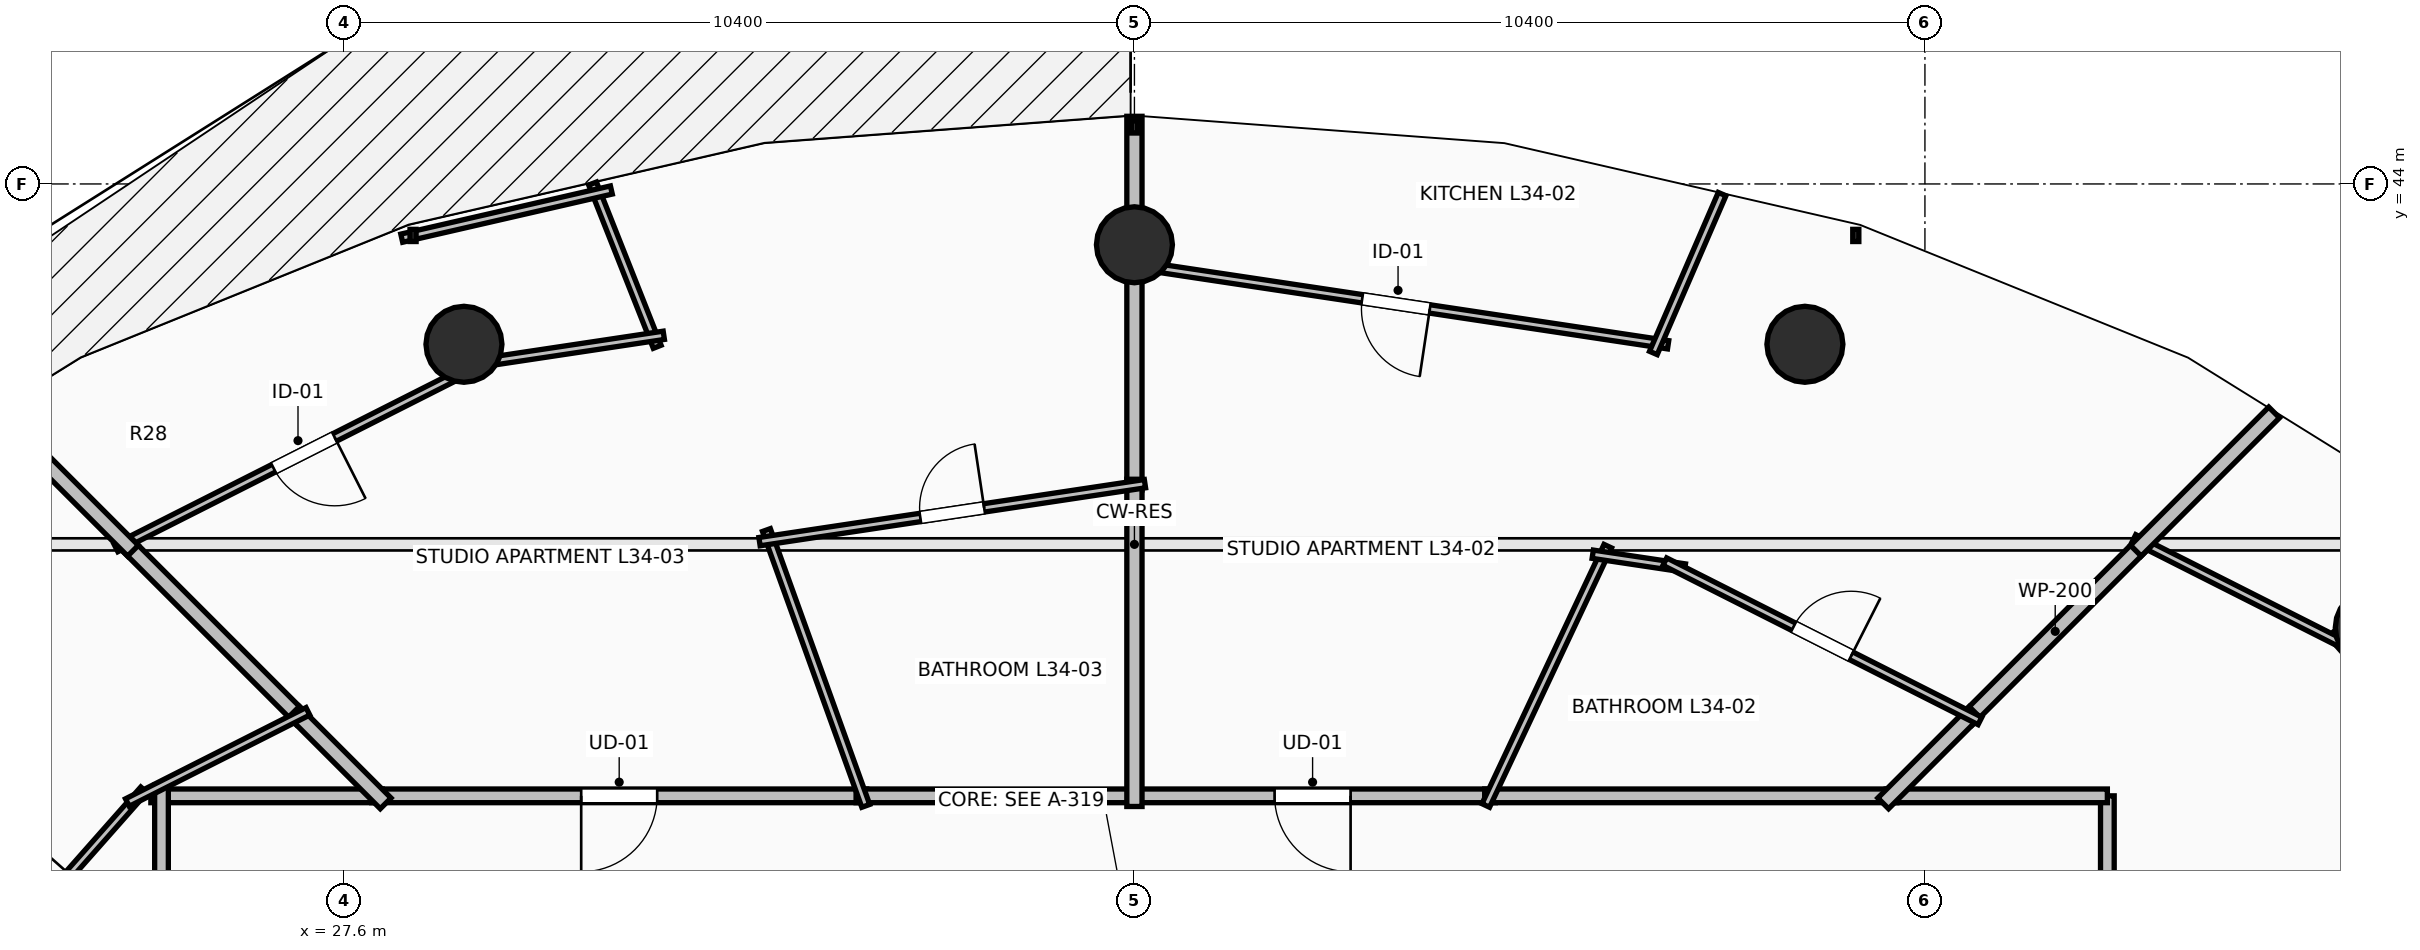
"""IFC4 building model, lengths in metres.
Left out: names, types, materials, properties, quantities, classifications, styles, units other than length and angle.
Written with IfcOpenShell. Run it as: python <this file> out.ifc"""

import sys

from ifc_helpers import new_model, si_unit, direction, frame, frame_2d, origin, origin_2d, place, context, subcontext, project, spatial, rectangle, circle, extrude, element, fill, save


model = new_model("IFC4")
c1 = context("Model", 3, precision=1e-05, world=origin(), true_north=direction((0.0, 1.0)))
c2 = subcontext(c1, "Body", "Model", "MODEL_VIEW")
j1 = project(units=[si_unit("LENGTHUNIT", "METRE"), si_unit("PLANEANGLEUNIT", "RADIAN")], contexts=[c1])
p1 = place(None, origin())
s1 = spatial("IfcSite", under=j1, at=p1, CompositionType="ELEMENT")
p2 = place(p1, origin())
s2 = spatial("IfcBuilding", under=s1, at=p2, CompositionType="ELEMENT")
p3 = place(p2, frame((0.0, 0.0, 129.1)))
s3 = spatial("IfcBuildingStorey", under=s2, at=p3, CompositionType="ELEMENT", Elevation=129.1)
for number, where, z_axis, x_axis in (
    (1, (54.299, 38.162, 0.0), (0.0, 0.0, 1.0), (0.707, 0.707, 0.0)),
    (2, (46.821, 41.891, 0.0), (0.0, 0.0, 1.0), (0.383, 0.924, 0.0)),
    (3, (38.0, 43.2, 0.0), (0.0, 0.0, 1.0), (0.0, 1.0, 0.0)),
    (4, (29.179, 41.891, 0.0), (0.0, 0.0, 1.0), (-0.383, 0.924, 0.0)),
):
    element("IfcColumn", number, at=place(p3, frame(where, z_axis=z_axis, x_axis=x_axis)), inside=s3, PredefinedType="COLUMN", context=c2, shape_type="SweptSolid", body=[
        extrude(circle(Radius=0.5, at=origin_2d()), origin(), (0.0, 0.0, 1.0), 3.5),
    ])
p4 = place(p3, frame((50.8, 30.548, 0.0), z_axis=(0.0, 0.0, 1.0), x_axis=(0.0, 1.0, 0.0)))
e5 = element("IfcWall", 5, at=p4, inside=s3, PredefinedType="PARTITIONING", context=c2, shape_type="SweptSolid", body=[
    extrude(rectangle(XDim=5.402, YDim=0.18, at=frame_2d((2.701, 0.0))), origin(), (0.0, 0.0, 1.0), 2.432),
])
p5 = place(p4, frame((2.201, 0.0, 0.0)))
e6 = element("IfcOpeningElement", 6, at=p5, cuts=e5, PredefinedType="OPENING", context=c2, shape_type="SweptSolid", body=[
    extrude(rectangle(XDim=1.0, YDim=2.15, at=frame_2d((0.5, 1.075))), frame((0.0, 0.105, 0.0), z_axis=(0.0, -1.0, 0.0), x_axis=(1.0, 0.0, 0.0)), (0.0, 0.0, 1.0), 0.21),
])
p6 = place(p3, frame((50.8, 35.95, 0.0), z_axis=(0.0, 0.0, 1.0), x_axis=(-1.0, 0.0, 0.0)))
e7 = element("IfcWall", 7, at=p6, inside=s3, PredefinedType="PARTITIONING", context=c2, shape_type="SweptSolid", body=[
    extrude(rectangle(XDim=2.91, YDim=0.18, at=frame_2d((1.455, 0.0))), origin(), (0.0, 0.0, 1.0), 2.432),
])
p7 = place(p3, frame((42.748, 35.95, 0.0), z_axis=(0.0, 0.0, 1.0), x_axis=(-1.0, 0.0, 0.0)))
e8 = element("IfcWall", 8, at=p7, inside=s3, PredefinedType="PARTITIONING", context=c2, shape_type="SweptSolid", body=[
    extrude(rectangle(XDim=4.808, YDim=0.18, at=frame_2d((2.404, 0.0))), origin(), (0.0, 0.0, 1.0), 3.24),
])
p8 = place(p7, frame((1.904, 0.0, 0.0)))
e9 = element("IfcOpeningElement", 9, at=p8, cuts=e8, PredefinedType="OPENING", context=c2, shape_type="SweptSolid", body=[
    extrude(rectangle(XDim=1.0, YDim=2.15, at=frame_2d((0.5, 1.075))), frame((0.0, 0.105, 0.0), z_axis=(0.0, -1.0, 0.0), x_axis=(1.0, 0.0, 0.0)), (0.0, 0.0, 1.0), 0.21),
])
p9 = place(p3, frame((48.03, 35.95, 0.0), z_axis=(0.0, 0.0, 1.0), x_axis=(-1.0, 0.0, 0.0)))
e10 = element("IfcWall", 10, at=p9, inside=s3, PredefinedType="PARTITIONING", context=c2, shape_type="SweptSolid", body=[
    extrude(rectangle(XDim=5.422, YDim=0.18, at=frame_2d((2.711, 0.0))), origin(), (0.0, 0.0, 1.0), 2.432),
])
p10 = place(p3, frame((34.478, 35.95, 0.0), z_axis=(0.0, 0.0, 1.0), x_axis=(-1.0, 0.0, 0.0)))
e11 = element("IfcWall", 11, at=p10, inside=s3, PredefinedType="PARTITIONING", context=c2, shape_type="SweptSolid", body=[
    extrude(rectangle(XDim=6.513, YDim=0.18, at=frame_2d((3.256, 0.0))), origin(), (0.0, 0.0, 1.0), 2.432),
])
p11 = place(p10, frame((2.757, 0.0, 0.0)))
e12 = element("IfcOpeningElement", 12, at=p11, cuts=e11, PredefinedType="OPENING", context=c2, shape_type="SweptSolid", body=[
    extrude(rectangle(XDim=1.0, YDim=2.15, at=frame_2d((0.5, 1.075))), frame((0.0, 0.105, 0.0), z_axis=(0.0, -1.0, 0.0), x_axis=(1.0, 0.0, 0.0)), (0.0, 0.0, 1.0), 0.21),
])
p12 = place(p3, frame((38.08, 35.95, 0.0), z_axis=(0.0, 0.0, 1.0), x_axis=(-1.0, 0.0, 0.0)))
e13 = element("IfcWall", 13, at=p12, inside=s3, PredefinedType="PARTITIONING", context=c2, shape_type="SweptSolid", body=[
    extrude(rectangle(XDim=3.742, YDim=0.18, at=frame_2d((1.871, 0.0))), origin(), (0.0, 0.0, 1.0), 3.24),
])
p13 = place(p3, frame((28.105, 35.95, 0.0), z_axis=(0.0, 0.0, 1.0), x_axis=(-1.0, 0.0, 0.0)))
e14 = element("IfcWall", 14, at=p13, inside=s3, PredefinedType="PARTITIONING", context=c2, shape_type="SweptSolid", body=[
    extrude(rectangle(XDim=3.045, YDim=0.18, at=frame_2d((1.522, 0.0))), origin(), (0.0, 0.0, 1.0), 2.432),
])
p14 = place(p3, frame((25.2, 36.09, 0.0), z_axis=(0.0, 0.0, 1.0), x_axis=(0.0, -1.0, 0.0)))
e15 = element("IfcWall", 15, at=p14, inside=s3, PredefinedType="PARTITIONING", context=c2, shape_type="SweptSolid", body=[
    extrude(rectangle(XDim=4.141, YDim=0.18, at=frame_2d((2.071, 0.0))), origin(), (0.0, 0.0, 1.0), 2.432),
])
p15 = place(p3, frame((57.668, 33.645, 0.0), z_axis=(0.0, 0.0, 1.0), x_axis=(-0.66214504072, 0.749375703536, 0.0)))
e16 = element("IfcWall", 16, at=p15, inside=s3, PredefinedType="PARTITIONING", context=c2, shape_type="SweptSolid", body=[
    extrude(rectangle(XDim=5.922, YDim=0.11, at=frame_2d((2.961, 0.0))), origin(), (0.0, 0.0, 1.0), 2.432),
])
p16 = place(p15, frame((2.511, 0.0, 0.0)))
e17 = element("IfcOpeningElement", 17, at=p16, cuts=e16, PredefinedType="OPENING", context=c2, shape_type="SweptSolid", body=[
    extrude(rectangle(XDim=0.9, YDim=2.1, at=frame_2d((0.45, 1.05))), frame((0.0, 0.07, 0.0), z_axis=(0.0, -1.0, 0.0), x_axis=(1.0, 0.0, 0.0)), (0.0, 0.0, 1.0), 0.14),
])
p17 = place(p3, frame((53.964, 37.915, 0.0), z_axis=(0.0, 0.0, 1.0), x_axis=(-0.892546166909, 0.450956028828, 0.0)))
e18 = element("IfcWall", 18, at=p17, inside=s3, PredefinedType="PARTITIONING", context=c2, shape_type="SweptSolid", body=[
    extrude(rectangle(XDim=3.154, YDim=0.11, at=frame_2d((1.577, 0.0))), origin(), (0.0, 0.0, 1.0), 2.432),
])
p18 = place(p3, frame((51.274, 39.274, 0.0), z_axis=(0.0, 0.0, 1.0), x_axis=(-0.707106781187, -0.707106781187, 0.0)))
e19 = element("IfcWall", 19, at=p18, inside=s3, PredefinedType="PARTITIONING", context=c2, shape_type="SweptSolid", body=[
    extrude(rectangle(XDim=3.281, YDim=0.2, at=frame_2d((1.64, 0.0))), origin(), (0.0, 0.0, 1.0), 2.874),
])
p19 = place(p3, frame((49.053, 37.053, 0.0), z_axis=(0.0, 0.0, 1.0), x_axis=(-0.707106781187, -0.707106781187, 0.0)))
e20 = element("IfcWall", 20, at=p19, inside=s3, PredefinedType="PARTITIONING", context=c2, shape_type="SweptSolid", body=[
    extrude(rectangle(XDim=1.7, YDim=0.2, at=frame_2d((0.85, 0.0))), origin(), (0.0, 0.0, 1.0), 2.432),
])
p20 = place(p3, frame((52.994, 40.994, 0.0), z_axis=(0.0, 0.0, 1.0), x_axis=(-0.707106781187, -0.707106781187, 0.0)))
e21 = element("IfcWall", 21, at=p20, inside=s3, PredefinedType="PARTITIONING", context=c2, shape_type="SweptSolid", body=[
    extrude(rectangle(XDim=2.572, YDim=0.2, at=frame_2d((1.286, 0.0))), origin(), (0.0, 0.0, 1.0), 2.728),
])
p21 = place(p3, frame((42.622, 35.823, 0.0), z_axis=(0.0, 0.0, 1.0), x_axis=(0.425768969191, 0.904831909735, 0.0)))
e22 = element("IfcWall", 22, at=p21, inside=s3, PredefinedType="PARTITIONING", context=c2, shape_type="SweptSolid", body=[
    extrude(rectangle(XDim=3.77, YDim=0.11, at=frame_2d((1.885, 0.0))), origin(), (0.0, 0.0, 1.0), 2.874),
])
p22 = place(p3, frame((44.03, 39.129, 0.0), z_axis=(0.0, 0.0, 1.0), x_axis=(0.988983067014, -0.148028690329, 0.0)))
e23 = element("IfcWall", 23, at=p22, inside=s3, PredefinedType="PARTITIONING", context=c2, shape_type="SweptSolid", body=[
    extrude(rectangle(XDim=1.225, YDim=0.11, at=frame_2d((0.613, 0.0))), origin(), (0.0, 0.0, 1.0), 2.874),
])
p23 = place(p3, frame((44.978, 39.031, 0.0), z_axis=(0.0, 0.0, 1.0), x_axis=(0.892495276856, -0.451056737882, 0.0)))
e24 = element("IfcWall", 24, at=p23, inside=s3, PredefinedType="PARTITIONING", context=c2, shape_type="SweptSolid", body=[
    extrude(rectangle(XDim=4.645, YDim=0.11, at=frame_2d((2.323, 0.0))), origin(), (0.0, 0.0, 1.0), 2.432),
])
p24 = place(p23, frame((1.898, 0.0, 0.0)))
e25 = element("IfcOpeningElement", 25, at=p24, cuts=e24, PredefinedType="OPENING", context=c2, shape_type="SweptSolid", body=[
    extrude(rectangle(XDim=0.85, YDim=2.1, at=frame_2d((0.425, 1.05))), frame((0.0, 0.07, 0.0), z_axis=(0.0, -1.0, 0.0), x_axis=(1.0, 0.0, 0.0)), (0.0, 0.0, 1.0), 0.14),
])
p25 = place(p3, frame((45.021, 41.884, 0.0), z_axis=(0.0, 0.0, 1.0), x_axis=(-0.988887079739, 0.148668569392, 0.0)))
e26 = element("IfcWall", 26, at=p25, inside=s3, PredefinedType="PARTITIONING", context=c2, shape_type="SweptSolid", body=[
    extrude(rectangle(XDim=7.24, YDim=0.11, at=frame_2d((3.62, 0.0))), origin(), (0.0, 0.0, 1.0), 2.432),
])
p26 = place(p25, frame((3.17, 0.0, 0.0)))
e27 = element("IfcOpeningElement", 27, at=p26, cuts=e26, PredefinedType="OPENING", context=c2, shape_type="SweptSolid", body=[
    extrude(rectangle(XDim=0.9, YDim=2.1, at=frame_2d((0.45, 1.05))), frame((0.0, 0.07, 0.0), z_axis=(0.0, -1.0, 0.0), x_axis=(1.0, 0.0, 0.0)), (0.0, 0.0, 1.0), 0.14),
])
p27 = place(p3, frame((45.732, 43.866, 0.0), z_axis=(0.0, 0.0, 1.0), x_axis=(-0.397125966554, -0.91776411277, 0.0)))
e28 = element("IfcWall", 28, at=p27, inside=s3, PredefinedType="PARTITIONING", context=c2, shape_type="SweptSolid", body=[
    extrude(rectangle(XDim=2.277, YDim=0.11, at=frame_2d((1.139, 0.0))), origin(), (0.0, 0.0, 1.0), 2.728),
])
p28 = place(p3, frame((38.0, 42.94, 0.0), z_axis=(0.0, 0.0, 1.0), x_axis=(0.0, -1.0, 0.0)))
e29 = element("IfcWall", 29, at=p28, inside=s3, PredefinedType="PARTITIONING", context=c2, shape_type="SweptSolid", body=[
    extrude(rectangle(XDim=2.965, YDim=0.2, at=frame_2d((1.482, 0.0))), origin(), (0.0, 0.0, 1.0), 2.874),
])
p29 = place(p3, frame((38.0, 40.115, 0.0), z_axis=(0.0, 0.0, 1.0), x_axis=(0.0, -1.0, 0.0)))
e30 = element("IfcWall", 30, at=p29, inside=s3, PredefinedType="PARTITIONING", context=c2, shape_type="SweptSolid", body=[
    extrude(rectangle(XDim=4.305, YDim=0.2, at=frame_2d((2.152, 0.0))), origin(), (0.0, 0.0, 1.0), 2.874),
])
p30 = place(p3, frame((38.0, 44.89, 0.0), z_axis=(0.0, 0.0, 1.0), x_axis=(0.0, -1.0, 0.0)))
e31 = element("IfcWall", 31, at=p30, inside=s3, PredefinedType="PARTITIONING", context=c2, shape_type="SweptSolid", body=[
    extrude(rectangle(XDim=2.09, YDim=0.2, at=frame_2d((1.045, 0.0))), origin(), (0.0, 0.0, 1.0), 3.24),
])
p31 = place(p3, frame((34.465, 35.818, 0.0), z_axis=(0.0, 0.0, 1.0), x_axis=(-0.338813618534, 0.940853512453, 0.0)))
e32 = element("IfcWall", 32, at=p31, inside=s3, PredefinedType="PARTITIONING", context=c2, shape_type="SweptSolid", body=[
    extrude(rectangle(XDim=3.856, YDim=0.11, at=frame_2d((1.928, 0.0))), origin(), (0.0, 0.0, 1.0), 2.432),
])
p32 = place(p3, frame((33.068, 39.294, 0.0), z_axis=(0.0, 0.0, 1.0), x_axis=(0.988876905643, 0.148736227888, 0.0)))
e33 = element("IfcWall", 33, at=p32, inside=s3, PredefinedType="PARTITIONING", context=c2, shape_type="SweptSolid", body=[
    extrude(rectangle(XDim=5.128, YDim=0.11, at=frame_2d((2.564, 0.0))), origin(), (0.0, 0.0, 1.0), 2.432),
])
p33 = place(p32, frame((2.139, 0.0, 0.0)))
e34 = element("IfcOpeningElement", 34, at=p33, cuts=e33, PredefinedType="OPENING", context=c2, shape_type="SweptSolid", body=[
    extrude(rectangle(XDim=0.85, YDim=2.1, at=frame_2d((0.425, 1.05))), frame((0.0, 0.07, 0.0), z_axis=(0.0, -1.0, 0.0), x_axis=(1.0, 0.0, 0.0)), (0.0, 0.0, 1.0), 0.14),
])
p34 = place(p3, frame((30.872, 44.005, 0.0), z_axis=(0.0, 0.0, 1.0), x_axis=(0.368016079814, -0.929819426017, 0.0)))
e35 = element("IfcWall", 35, at=p34, inside=s3, PredefinedType="PARTITIONING", context=c2, shape_type="SweptSolid", body=[
    extrude(rectangle(XDim=2.309, YDim=0.11, at=frame_2d((1.155, 0.0))), origin(), (0.0, 0.0, 1.0), 2.728),
])
p35 = place(p3, frame((31.808, 42.009, 0.0), z_axis=(0.0, 0.0, 1.0), x_axis=(-0.988887788943, -0.148663851958, 0.0)))
e36 = element("IfcWall", 36, at=p35, inside=s3, PredefinedType="PARTITIONING", context=c2, shape_type="SweptSolid", body=[
    extrude(rectangle(XDim=2.547, YDim=0.11, at=frame_2d((1.273, 0.0))), origin(), (0.0, 0.0, 1.0), 3.24),
])
p36 = place(p3, frame((29.553, 41.714, 0.0), z_axis=(0.0, 0.0, 1.0), x_axis=(-0.892438454993, -0.451169152369, 0.0)))
e37 = element("IfcWall", 37, at=p36, inside=s3, PredefinedType="PARTITIONING", context=c2, shape_type="SweptSolid", body=[
    extrude(rectangle(XDim=5.549, YDim=0.11, at=frame_2d((2.774, 0.0))), origin(), (0.0, 0.0, 1.0), 2.432),
])
p37 = place(p36, frame((2.324, 0.0, 0.0)))
e38 = element("IfcOpeningElement", 38, at=p37, cuts=e37, PredefinedType="OPENING", context=c2, shape_type="SweptSolid", body=[
    extrude(rectangle(XDim=0.9, YDim=2.1, at=frame_2d((0.45, 1.05))), frame((0.0, 0.07, 0.0), z_axis=(0.0, -1.0, 0.0), x_axis=(1.0, 0.0, 0.0)), (0.0, 0.0, 1.0), 0.14),
])
p38 = place(p3, frame((31.118, 43.92, 0.0), z_axis=(0.0, 0.0, 1.0), x_axis=(-0.974594373263, -0.223977247963, 0.0)))
e39 = element("IfcWall", 39, at=p38, inside=s3, PredefinedType="PARTITIONING", context=c2, shape_type="SweptSolid", body=[
    extrude(rectangle(XDim=2.83, YDim=0.11, at=frame_2d((1.415, 0.0))), origin(), (0.0, 0.0, 1.0), 3.24),
])
p39 = place(p3, frame((24.726, 39.274, 0.0), z_axis=(0.0, 0.0, 1.0), x_axis=(0.707106781187, -0.707106781187, 0.0)))
e40 = element("IfcWall", 40, at=p39, inside=s3, PredefinedType="PARTITIONING", context=c2, shape_type="SweptSolid", body=[
    extrude(rectangle(XDim=3.277, YDim=0.2, at=frame_2d((1.638, 0.0))), origin(), (0.0, 0.0, 1.0), 2.874),
])
p40 = place(p3, frame((26.944, 37.056, 0.0), z_axis=(0.0, 0.0, 1.0), x_axis=(0.707106781187, -0.707106781187, 0.0)))
e41 = element("IfcWall", 41, at=p40, inside=s3, PredefinedType="PARTITIONING", context=c2, shape_type="SweptSolid", body=[
    extrude(rectangle(XDim=1.704, YDim=0.2, at=frame_2d((0.852, 0.0))), origin(), (0.0, 0.0, 1.0), 2.432),
])
p41 = place(p3, frame((23.006, 40.994, 0.0), z_axis=(0.0, 0.0, 1.0), x_axis=(0.707106781187, -0.707106781187, 0.0)))
e42 = element("IfcWall", 42, at=p41, inside=s3, PredefinedType="PARTITIONING", context=c2, shape_type="SweptSolid", body=[
    extrude(rectangle(XDim=2.572, YDim=0.2, at=frame_2d((1.286, 0.0))), origin(), (0.0, 0.0, 1.0), 2.728),
])
p42 = place(p3, frame((22.443, 33.172, 0.0), z_axis=(0.0, 0.0, 1.0), x_axis=(0.662199468358, 0.749327607997, 0.0)))
e43 = element("IfcWall", 43, at=p42, inside=s3, PredefinedType="PARTITIONING", context=c2, shape_type="SweptSolid", body=[
    extrude(rectangle(XDim=3.814, YDim=0.11, at=frame_2d((1.907, 0.0))), origin(), (0.0, 0.0, 1.0), 2.432),
])
p43 = place(p42, frame((1.482, 0.0, 0.0)))
e44 = element("IfcOpeningElement", 44, at=p43, cuts=e43, PredefinedType="OPENING", context=c2, shape_type="SweptSolid", body=[
    extrude(rectangle(XDim=0.85, YDim=2.1, at=frame_2d((0.425, 1.05))), frame((0.0, 0.07, 0.0), z_axis=(0.0, -1.0, 0.0), x_axis=(1.0, 0.0, 0.0)), (0.0, 0.0, 1.0), 0.14),
])
p44 = place(p3, frame((24.751, 35.862, 0.0), z_axis=(0.0, 0.0, 1.0), x_axis=(0.892455114256, 0.451136197882, 0.0)))
e45 = element("IfcWall", 45, at=p44, inside=s3, PredefinedType="PARTITIONING", context=c2, shape_type="SweptSolid", body=[
    extrude(rectangle(XDim=2.661, YDim=0.11, at=frame_2d((1.331, 0.0))), origin(), (0.0, 0.0, 1.0), 3.24),
])
p45 = place(p8, origin())
e46 = element("IfcDoor", 46, at=p45, inside=s3, OperationType="SINGLE_SWING_LEFT", PredefinedType="DOOR", context=c2, shape_type="SweptSolid", body=[
    extrude(rectangle(XDim=1.0, YDim=2.15, at=frame_2d((0.5, 1.075))), frame((0.0, 0.025, 0.0), z_axis=(0.0, -1.0, 0.0), x_axis=(1.0, 0.0, 0.0)), (0.0, 0.0, 1.0), 0.05),
])
fill(e9, e46)
p46 = place(p11, origin())
e47 = element("IfcDoor", 47, at=p46, inside=s3, OperationType="SINGLE_SWING_RIGHT", PredefinedType="DOOR", context=c2, shape_type="SweptSolid", body=[
    extrude(rectangle(XDim=1.0, YDim=2.15, at=frame_2d((0.5, 1.075))), frame((0.0, 0.025, 0.0), z_axis=(0.0, -1.0, 0.0), x_axis=(1.0, 0.0, 0.0)), (0.0, 0.0, 1.0), 0.05),
])
fill(e12, e47)
p47 = place(p24, origin())
e48 = element("IfcDoor", 48, at=p47, inside=s3, OperationType="SINGLE_SWING_RIGHT", PredefinedType="DOOR", context=c2, shape_type="SweptSolid", body=[
    extrude(rectangle(XDim=0.85, YDim=2.1, at=frame_2d((0.425, 1.05))), frame((0.0, 0.025, 0.0), z_axis=(0.0, -1.0, 0.0), x_axis=(1.0, 0.0, 0.0)), (0.0, 0.0, 1.0), 0.05),
])
fill(e25, e48)
p48 = place(p26, origin())
e49 = element("IfcDoor", 49, at=p48, inside=s3, OperationType="SINGLE_SWING_LEFT", PredefinedType="DOOR", context=c2, shape_type="SweptSolid", body=[
    extrude(rectangle(XDim=0.9, YDim=2.1, at=frame_2d((0.45, 1.05))), frame((0.0, 0.025, 0.0), z_axis=(0.0, -1.0, 0.0), x_axis=(1.0, 0.0, 0.0)), (0.0, 0.0, 1.0), 0.05),
])
fill(e27, e49)
p49 = place(p33, origin())
e50 = element("IfcDoor", 50, at=p49, inside=s3, OperationType="SINGLE_SWING_RIGHT", PredefinedType="DOOR", context=c2, shape_type="SweptSolid", body=[
    extrude(rectangle(XDim=0.85, YDim=2.1, at=frame_2d((0.425, 1.05))), frame((0.0, 0.025, 0.0), z_axis=(0.0, -1.0, 0.0), x_axis=(1.0, 0.0, 0.0)), (0.0, 0.0, 1.0), 0.05),
])
fill(e34, e50)
p50 = place(p37, origin())
e51 = element("IfcDoor", 51, at=p50, inside=s3, OperationType="SINGLE_SWING_LEFT", PredefinedType="DOOR", context=c2, shape_type="SweptSolid", body=[
    extrude(rectangle(XDim=0.9, YDim=2.1, at=frame_2d((0.45, 1.05))), frame((0.0, 0.025, 0.0), z_axis=(0.0, -1.0, 0.0), x_axis=(1.0, 0.0, 0.0)), (0.0, 0.0, 1.0), 0.05),
])
fill(e38, e51)
save(model, sys.argv[1])
